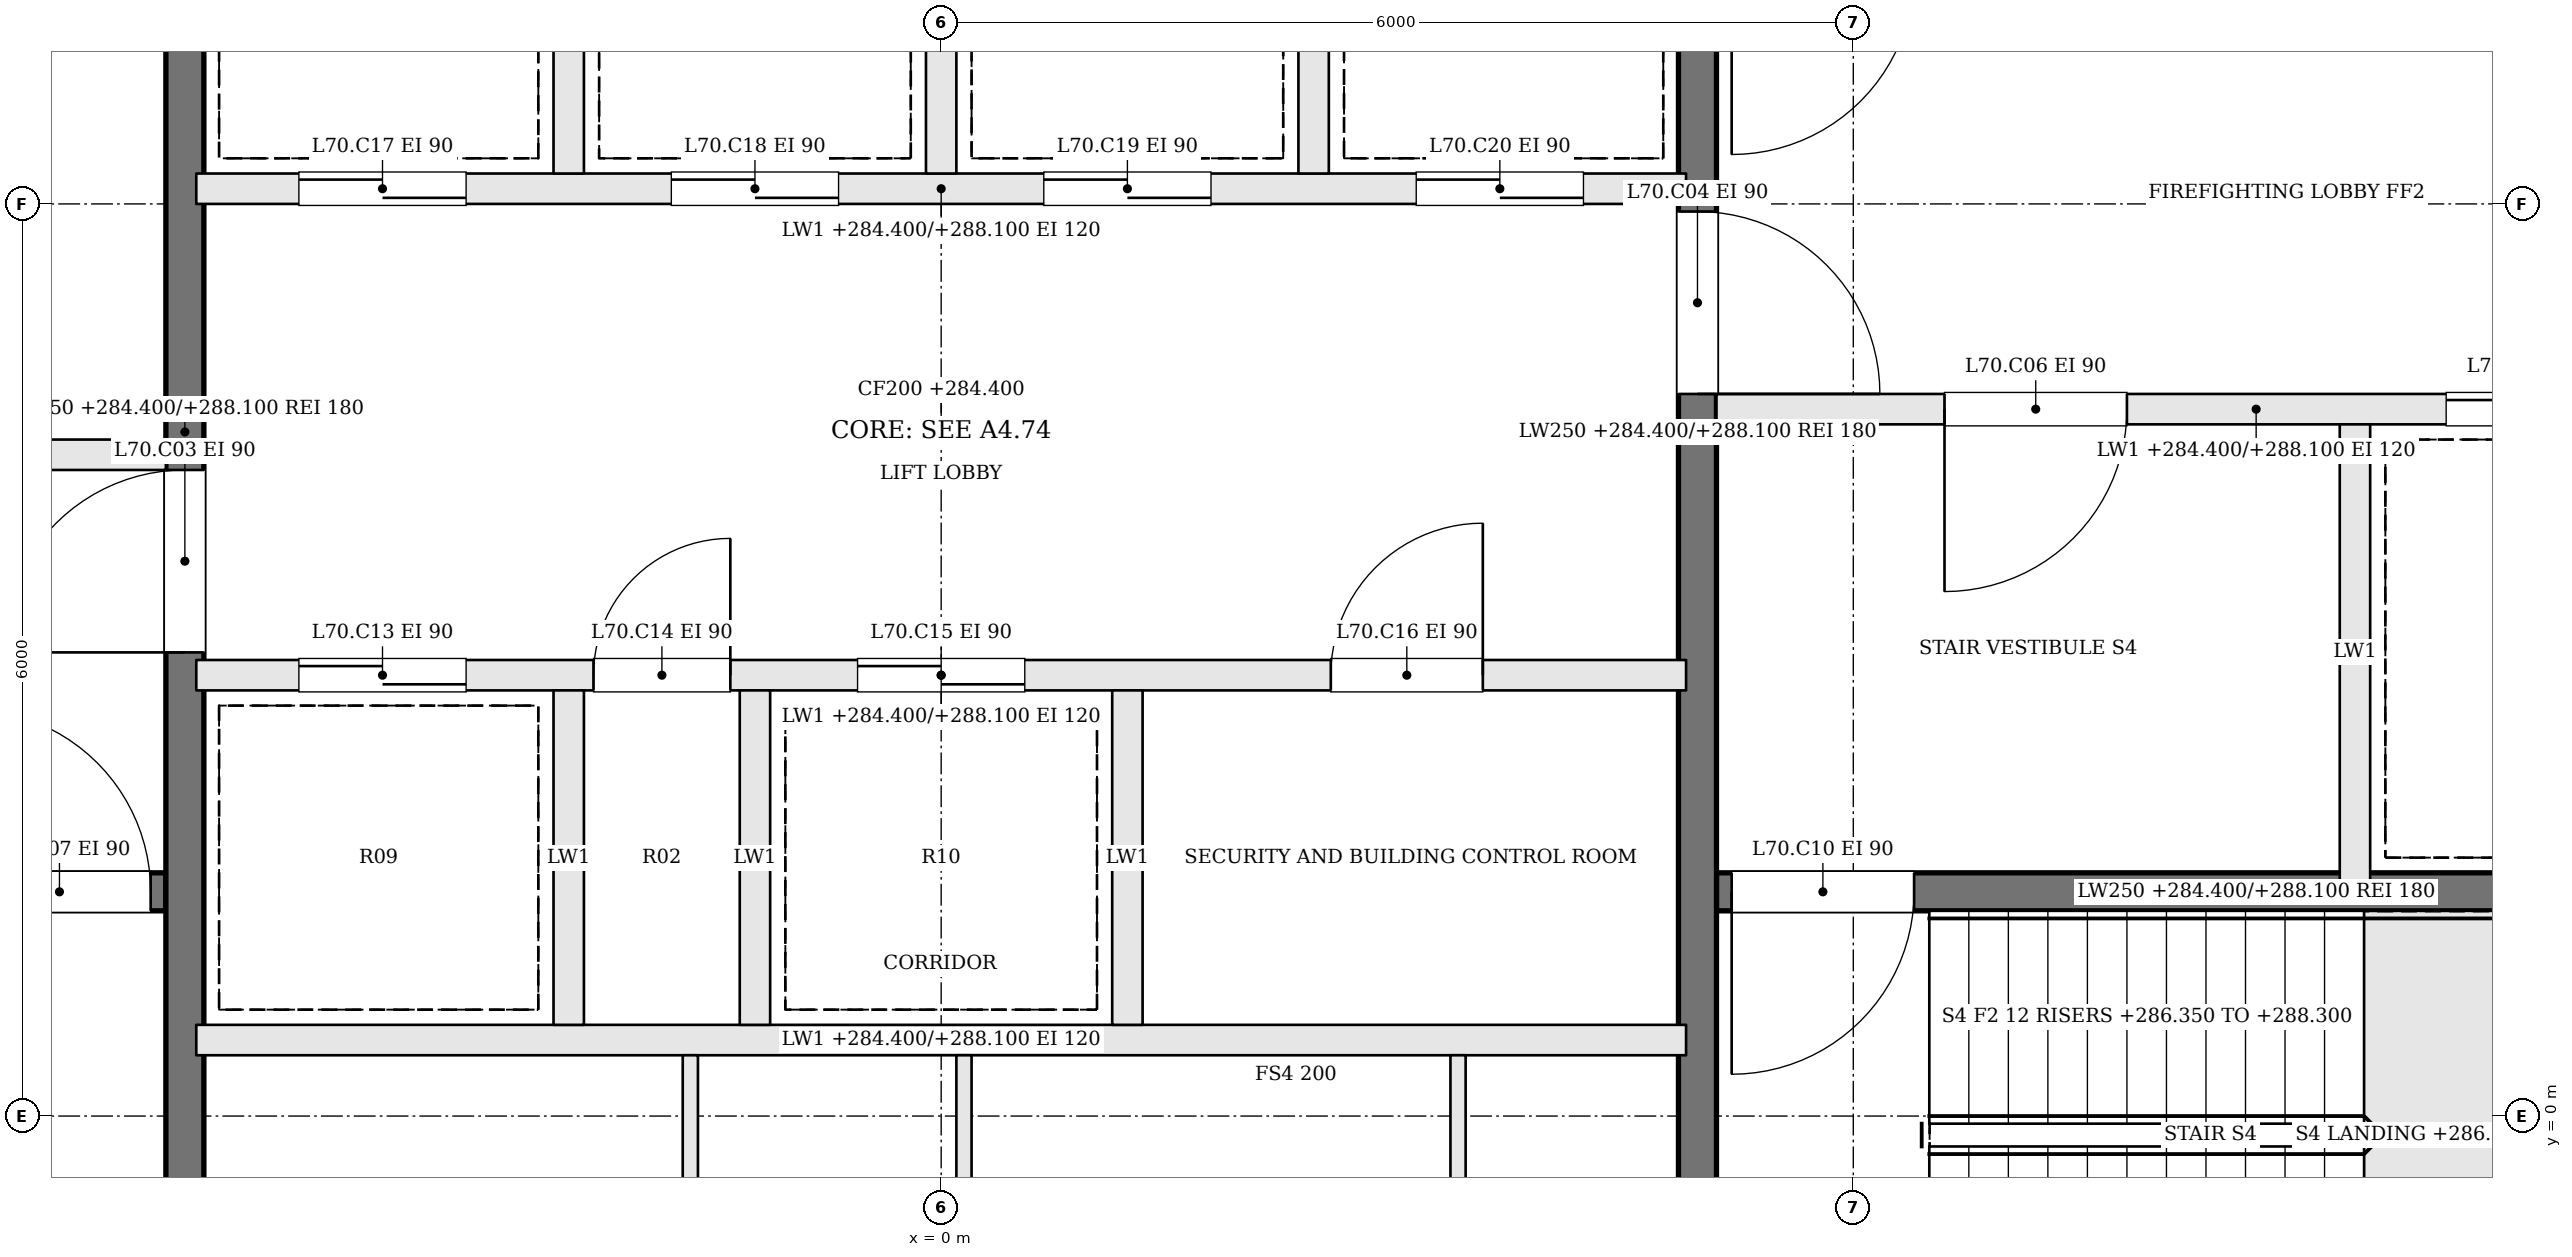
"""IFC4 building model, lengths in metres.
Left out: names, types, materials, properties, quantities, classifications, styles, units other than length and angle.
Written with IfcOpenShell. Run it as: python <this file> out.ifc"""

import sys

from ifc_helpers import new_model, si_unit, direction, frame, frame_2d, origin, place, context, subcontext, project, spatial, rectangle, extrude, element, fill, save


model = new_model("IFC4")
c1 = context("Model", 3, precision=1e-05, world=origin(), true_north=direction((0.0, 1.0)))
c2 = subcontext(c1, "Body", "Model", "MODEL_VIEW")
j1 = project(units=[si_unit("LENGTHUNIT", "METRE"), si_unit("PLANEANGLEUNIT", "RADIAN")], contexts=[c1])
p1 = place(None, origin())
s1 = spatial("IfcSite", under=j1, at=p1, CompositionType="ELEMENT")
p2 = place(p1, origin())
s2 = spatial("IfcBuilding", under=s1, at=p2, CompositionType="ELEMENT")
p3 = place(p2, frame((0.0, 0.0, 284.4)))
s3 = spatial("IfcBuildingStorey", under=s2, at=p3, CompositionType="ELEMENT", Elevation=284.4)
p4 = place(p3, frame((-12.2, 1.475, 0.0), z_axis=(0.0, 0.0, 1.0), x_axis=(1.0, 0.0, 0.0)))
e1 = element("IfcWall", 1, at=p4, inside=s3, PredefinedType="SOLIDWALL", context=c2, shape_type="SweptSolid", body=[
    extrude(rectangle(XDim=7.1, YDim=0.25, at=frame_2d((3.55, 0.0))), origin(), (0.0, 0.0, 1.0), 3.7),
])
p5 = place(p4, frame((5.8, 0.0, 0.0)))
e2 = element("IfcOpeningElement", 2, at=p5, cuts=e1, PredefinedType="OPENING", context=c2, shape_type="SweptSolid", body=[
    extrude(rectangle(XDim=1.2, YDim=2.1, at=frame_2d((0.6, 1.05))), frame((0.0, 0.135, 0.0), z_axis=(0.0, -1.0, 0.0), x_axis=(1.0, 0.0, 0.0)), (0.0, 0.0, 1.0), 0.27),
])
p6 = place(p3, frame((-12.2, 4.35, 0.0), z_axis=(0.0, 0.0, 1.0), x_axis=(1.0, 0.0, 0.0)))
e3 = element("IfcWall", 3, at=p6, inside=s3, PredefinedType="SOLIDWALL", context=c2, shape_type="SweptSolid", body=[
    extrude(rectangle(XDim=7.1, YDim=0.2, at=frame_2d((3.55, 0.0))), origin(), (0.0, 0.0, 1.0), 3.7),
])
p7 = place(p6, frame((4.4, 0.0, 0.0)))
e4 = element("IfcOpeningElement", 4, at=p7, cuts=e3, PredefinedType="OPENING", context=c2, shape_type="SweptSolid", body=[
    extrude(rectangle(XDim=1.2, YDim=2.1, at=frame_2d((0.6, 1.05))), frame((0.0, 0.11, 0.0), z_axis=(0.0, -1.0, 0.0), x_axis=(1.0, 0.0, 0.0)), (0.0, 0.0, 1.0), 0.22),
])
p8 = place(p6, frame((1.1, 0.0, 0.0)))
e5 = element("IfcOpeningElement", 5, at=p8, cuts=e3, PredefinedType="OPENING", context=c2, shape_type="SweptSolid", body=[
    extrude(rectangle(XDim=1.2, YDim=2.1, at=frame_2d((0.6, 1.05))), frame((0.0, 0.11, 0.0), z_axis=(0.0, -1.0, 0.0), x_axis=(1.0, 0.0, 0.0)), (0.0, 0.0, 1.0), 0.22),
])
p9 = place(p3, frame((12.2, 4.65, 0.0), z_axis=(0.0, 0.0, 1.0), x_axis=(-1.0, 0.0, 0.0)))
e6 = element("IfcWall", 6, at=p9, inside=s3, PredefinedType="SOLIDWALL", context=c2, shape_type="SweptSolid", body=[
    extrude(rectangle(XDim=7.1, YDim=0.2, at=frame_2d((3.55, 0.0))), origin(), (0.0, 0.0, 1.0), 3.7),
])
p10 = place(p9, frame((4.4, 0.0, 0.0)))
e7 = element("IfcOpeningElement", 7, at=p10, cuts=e6, PredefinedType="OPENING", context=c2, shape_type="SweptSolid", body=[
    extrude(rectangle(XDim=1.2, YDim=2.1, at=frame_2d((0.6, 1.05))), frame((0.0, 0.11, 0.0), z_axis=(0.0, -1.0, 0.0), x_axis=(1.0, 0.0, 0.0)), (0.0, 0.0, 1.0), 0.22),
])
p11 = place(p9, frame((1.1, 0.0, 0.0)))
e8 = element("IfcOpeningElement", 8, at=p11, cuts=e6, PredefinedType="OPENING", context=c2, shape_type="SweptSolid", body=[
    extrude(rectangle(XDim=1.2, YDim=2.1, at=frame_2d((0.6, 1.05))), frame((0.0, 0.11, 0.0), z_axis=(0.0, -1.0, 0.0), x_axis=(1.0, 0.0, 0.0)), (0.0, 0.0, 1.0), 0.22),
])
p12 = place(p3, frame((12.2, 1.475, 0.0), z_axis=(0.0, 0.0, 1.0), x_axis=(-1.0, 0.0, 0.0)))
e9 = element("IfcWall", 9, at=p12, inside=s3, PredefinedType="SOLIDWALL", context=c2, shape_type="SweptSolid", body=[
    extrude(rectangle(XDim=7.1, YDim=0.25, at=frame_2d((3.55, 0.0))), origin(), (0.0, 0.0, 1.0), 3.7),
])
p13 = place(p12, frame((5.8, 0.0, 0.0)))
e10 = element("IfcOpeningElement", 10, at=p13, cuts=e9, PredefinedType="OPENING", context=c2, shape_type="SweptSolid", body=[
    extrude(rectangle(XDim=1.2, YDim=2.1, at=frame_2d((0.6, 1.05))), frame((0.0, 0.135, 0.0), z_axis=(0.0, -1.0, 0.0), x_axis=(1.0, 0.0, 0.0)), (0.0, 0.0, 1.0), 0.27),
])
p14 = place(p3, frame((9.3, 4.55, 0.0), z_axis=(0.0, 0.0, 1.0), x_axis=(0.0, -1.0, 0.0)))
e11 = element("IfcWall", 11, at=p14, inside=s3, PredefinedType="SOLIDWALL", context=c2, shape_type="SweptSolid", body=[
    extrude(rectangle(XDim=3.0, YDim=0.2, at=frame_2d((1.5, 0.0))), origin(), (0.0, 0.0, 1.0), 3.7),
])
p15 = place(p3, frame((-4.975, -2.2, 0.0), z_axis=(0.0, 0.0, 1.0), x_axis=(0.0, 1.0, 0.0)))
e12 = element("IfcWall", 12, at=p15, inside=s3, PredefinedType="SOLIDWALL", context=c2, shape_type="SweptSolid", body=[
    extrude(rectangle(XDim=13.4, YDim=0.25, at=frame_2d((6.7, 0.0))), origin(), (0.0, 0.0, 1.0), 3.7),
])
p16 = place(p15, frame((5.25, 0.0, 0.0)))
e13 = element("IfcOpeningElement", 13, at=p16, cuts=e12, PredefinedType="OPENING", context=c2, shape_type="SweptSolid", body=[
    extrude(rectangle(XDim=1.2, YDim=2.1, at=frame_2d((0.6, 1.05))), frame((0.0, 0.135, 0.0), z_axis=(0.0, -1.0, 0.0), x_axis=(1.0, 0.0, 0.0)), (0.0, 0.0, 1.0), 0.27),
])
p17 = place(p3, frame((4.975, 11.2, 0.0), z_axis=(0.0, 0.0, 1.0), x_axis=(0.0, -1.0, 0.0)))
e14 = element("IfcWall", 14, at=p17, inside=s3, PredefinedType="SOLIDWALL", context=c2, shape_type="SweptSolid", body=[
    extrude(rectangle(XDim=13.4, YDim=0.25, at=frame_2d((6.7, 0.0))), origin(), (0.0, 0.0, 1.0), 3.7),
])
p18 = place(p17, frame((5.25, 0.0, 0.0)))
e15 = element("IfcOpeningElement", 15, at=p18, cuts=e14, PredefinedType="OPENING", context=c2, shape_type="SweptSolid", body=[
    extrude(rectangle(XDim=1.2, YDim=2.1, at=frame_2d((0.6, 1.05))), frame((0.0, 0.135, 0.0), z_axis=(0.0, -1.0, 0.0), x_axis=(1.0, 0.0, 0.0)), (0.0, 0.0, 1.0), 0.27),
])
p19 = place(p3, frame((-4.9, 0.5, 0.0), z_axis=(0.0, 0.0, 1.0), x_axis=(1.0, 0.0, 0.0)))
e16 = element("IfcWall", 16, at=p19, inside=s3, PredefinedType="SOLIDWALL", context=c2, shape_type="SweptSolid", body=[
    extrude(rectangle(XDim=9.8, YDim=0.2, at=frame_2d((4.9, 0.0))), origin(), (0.0, 0.0, 1.0), 3.7),
])
p20 = place(p3, frame((-4.9, 2.9, 0.0), z_axis=(0.0, 0.0, 1.0), x_axis=(1.0, 0.0, 0.0)))
e17 = element("IfcWall", 17, at=p20, inside=s3, PredefinedType="SOLIDWALL", context=c2, shape_type="SweptSolid", body=[
    extrude(rectangle(XDim=9.8, YDim=0.2, at=frame_2d((4.9, 0.0))), origin(), (0.0, 0.0, 1.0), 3.7),
])
p21 = place(p20, frame((0.675, 0.0, 0.0)))
e18 = element("IfcOpeningElement", 18, at=p21, cuts=e17, PredefinedType="OPENING", context=c2, shape_type="SweptSolid", body=[
    extrude(rectangle(XDim=1.1, YDim=2.1, at=frame_2d((0.55, 1.05))), frame((0.0, 0.11, 0.0), z_axis=(0.0, -1.0, 0.0), x_axis=(1.0, 0.0, 0.0)), (0.0, 0.0, 1.0), 0.22),
])
p22 = place(p20, frame((2.613, 0.0, 0.0)))
e19 = element("IfcOpeningElement", 19, at=p22, cuts=e17, PredefinedType="OPENING", context=c2, shape_type="SweptSolid", body=[
    extrude(rectangle(XDim=0.9, YDim=2.1, at=frame_2d((0.45, 1.05))), frame((0.0, 0.11, 0.0), z_axis=(0.0, -1.0, 0.0), x_axis=(1.0, 0.0, 0.0)), (0.0, 0.0, 1.0), 0.22),
])
p23 = place(p20, frame((4.35, 0.0, 0.0)))
e20 = element("IfcOpeningElement", 20, at=p23, cuts=e17, PredefinedType="OPENING", context=c2, shape_type="SweptSolid", body=[
    extrude(rectangle(XDim=1.1, YDim=2.1, at=frame_2d((0.55, 1.05))), frame((0.0, 0.11, 0.0), z_axis=(0.0, -1.0, 0.0), x_axis=(1.0, 0.0, 0.0)), (0.0, 0.0, 1.0), 0.22),
])
p24 = place(p20, frame((7.463, 0.0, 0.0)))
e21 = element("IfcOpeningElement", 21, at=p24, cuts=e17, PredefinedType="OPENING", context=c2, shape_type="SweptSolid", body=[
    extrude(rectangle(XDim=1.0, YDim=2.1, at=frame_2d((0.5, 1.05))), frame((0.0, 0.11, 0.0), z_axis=(0.0, -1.0, 0.0), x_axis=(1.0, 0.0, 0.0)), (0.0, 0.0, 1.0), 0.22),
])
p25 = place(p3, frame((-4.9, 6.1, 0.0), z_axis=(0.0, 0.0, 1.0), x_axis=(1.0, 0.0, 0.0)))
e22 = element("IfcWall", 22, at=p25, inside=s3, PredefinedType="SOLIDWALL", context=c2, shape_type="SweptSolid", body=[
    extrude(rectangle(XDim=9.8, YDim=0.2, at=frame_2d((4.9, 0.0))), origin(), (0.0, 0.0, 1.0), 3.7),
])
p26 = place(p25, frame((0.675, 0.0, 0.0)))
e23 = element("IfcOpeningElement", 23, at=p26, cuts=e22, PredefinedType="OPENING", context=c2, shape_type="SweptSolid", body=[
    extrude(rectangle(XDim=1.1, YDim=2.1, at=frame_2d((0.55, 1.05))), frame((0.0, 0.11, 0.0), z_axis=(0.0, -1.0, 0.0), x_axis=(1.0, 0.0, 0.0)), (0.0, 0.0, 1.0), 0.22),
])
p27 = place(p25, frame((3.125, 0.0, 0.0)))
e24 = element("IfcOpeningElement", 24, at=p27, cuts=e22, PredefinedType="OPENING", context=c2, shape_type="SweptSolid", body=[
    extrude(rectangle(XDim=1.1, YDim=2.1, at=frame_2d((0.55, 1.05))), frame((0.0, 0.11, 0.0), z_axis=(0.0, -1.0, 0.0), x_axis=(1.0, 0.0, 0.0)), (0.0, 0.0, 1.0), 0.22),
])
p28 = place(p25, frame((5.575, 0.0, 0.0)))
e25 = element("IfcOpeningElement", 25, at=p28, cuts=e22, PredefinedType="OPENING", context=c2, shape_type="SweptSolid", body=[
    extrude(rectangle(XDim=1.1, YDim=2.1, at=frame_2d((0.55, 1.05))), frame((0.0, 0.11, 0.0), z_axis=(0.0, -1.0, 0.0), x_axis=(1.0, 0.0, 0.0)), (0.0, 0.0, 1.0), 0.22),
])
p29 = place(p25, frame((8.025, 0.0, 0.0)))
e26 = element("IfcOpeningElement", 26, at=p29, cuts=e22, PredefinedType="OPENING", context=c2, shape_type="SweptSolid", body=[
    extrude(rectangle(XDim=1.1, YDim=2.1, at=frame_2d((0.55, 1.05))), frame((0.0, 0.11, 0.0), z_axis=(0.0, -1.0, 0.0), x_axis=(1.0, 0.0, 0.0)), (0.0, 0.0, 1.0), 0.22),
])
for number, where, z_axis, x_axis in (
    (27, (-2.45, 0.6, 0.0), (0.0, 0.0, 1.0), (0.0, 1.0, 0.0)),
    (28, (-1.225, 0.6, 0.0), (0.0, 0.0, 1.0), (0.0, 1.0, 0.0)),
    (29, (1.225, 0.6, 0.0), (0.0, 0.0, 1.0), (0.0, 1.0, 0.0)),
    (30, (-2.45, 6.2, 0.0), (0.0, 0.0, 1.0), (0.0, 1.0, 0.0)),
    (31, (0.0, 6.2, 0.0), (0.0, 0.0, 1.0), (0.0, 1.0, 0.0)),
    (32, (2.45, 6.2, 0.0), (0.0, 0.0, 1.0), (0.0, 1.0, 0.0)),
):
    element("IfcWall", number, at=place(p3, frame(where, z_axis=z_axis, x_axis=x_axis)), inside=s3, PredefinedType="SOLIDWALL", context=c2, shape_type="SweptSolid", body=[
        extrude(rectangle(XDim=2.2, YDim=0.2, at=frame_2d((1.1, 0.0))), origin(), (0.0, 0.0, 1.0), 3.7),
    ])
for number, where, z_axis, x_axis in (
    (33, (-1.65, -2.2, 0.0), (0.0, 0.0, 1.0), (0.0, 1.0, 0.0)),
    (34, (0.15, -2.2, 0.0), (0.0, 0.0, 1.0), (0.0, 1.0, 0.0)),
    (35, (3.4, -2.2, 0.0), (0.0, 0.0, 1.0), (0.0, 1.0, 0.0)),
):
    element("IfcWall", number, at=place(p3, frame(where, z_axis=z_axis, x_axis=x_axis)), inside=s3, PredefinedType="PARTITIONING", context=c2, shape_type="SweptSolid", body=[
        extrude(rectangle(XDim=2.6, YDim=0.1, at=frame_2d((1.3, 0.0))), origin(), (0.0, 0.0, 1.0), 3.7),
    ])
p30 = place(p16, origin())
e36 = element("IfcDoor", 36, at=p30, inside=s3, OperationType="SINGLE_SWING_LEFT", PredefinedType="DOOR", context=c2, shape_type="SweptSolid", body=[
    extrude(rectangle(XDim=1.2, YDim=2.1, at=frame_2d((0.6, 1.05))), frame((0.0, 0.025, 0.0), z_axis=(0.0, -1.0, 0.0), x_axis=(1.0, 0.0, 0.0)), (0.0, 0.0, 1.0), 0.05),
])
fill(e13, e36)
p31 = place(p18, origin())
e37 = element("IfcDoor", 37, at=p31, inside=s3, OperationType="SINGLE_SWING_RIGHT", PredefinedType="DOOR", context=c2, shape_type="SweptSolid", body=[
    extrude(rectangle(XDim=1.2, YDim=2.1, at=frame_2d((0.6, 1.05))), frame((0.0, 0.025, 0.0), z_axis=(0.0, -1.0, 0.0), x_axis=(1.0, 0.0, 0.0)), (0.0, 0.0, 1.0), 0.05),
])
fill(e15, e37)
p32 = place(p10, origin())
e38 = element("IfcDoor", 38, at=p32, inside=s3, OperationType="SINGLE_SWING_RIGHT", PredefinedType="DOOR", context=c2, shape_type="SweptSolid", body=[
    extrude(rectangle(XDim=1.2, YDim=2.1, at=frame_2d((0.6, 1.05))), frame((0.0, 0.025, 0.0), z_axis=(0.0, -1.0, 0.0), x_axis=(1.0, 0.0, 0.0)), (0.0, 0.0, 1.0), 0.05),
])
fill(e7, e38)
p33 = place(p5, origin())
e39 = element("IfcDoor", 39, at=p33, inside=s3, OperationType="SINGLE_SWING_LEFT", PredefinedType="DOOR", context=c2, shape_type="SweptSolid", body=[
    extrude(rectangle(XDim=1.2, YDim=2.1, at=frame_2d((0.6, 1.05))), frame((0.0, 0.025, 0.0), z_axis=(0.0, -1.0, 0.0), x_axis=(1.0, 0.0, 0.0)), (0.0, 0.0, 1.0), 0.05),
])
fill(e2, e39)
p34 = place(p13, origin())
e40 = element("IfcDoor", 40, at=p34, inside=s3, OperationType="SINGLE_SWING_RIGHT", PredefinedType="DOOR", context=c2, shape_type="SweptSolid", body=[
    extrude(rectangle(XDim=1.2, YDim=2.1, at=frame_2d((0.6, 1.05))), frame((0.0, 0.025, 0.0), z_axis=(0.0, -1.0, 0.0), x_axis=(1.0, 0.0, 0.0)), (0.0, 0.0, 1.0), 0.05),
])
fill(e10, e40)
p35 = place(p11, origin())
e41 = element("IfcDoor", 41, at=p35, inside=s3, OperationType="SLIDING_TO_RIGHT", PredefinedType="DOOR", context=c2, shape_type="SweptSolid", body=[
    extrude(rectangle(XDim=1.2, YDim=2.1, at=frame_2d((0.6, 1.05))), frame((0.0, 0.025, 0.0), z_axis=(0.0, -1.0, 0.0), x_axis=(1.0, 0.0, 0.0)), (0.0, 0.0, 1.0), 0.05),
])
fill(e8, e41)
p36 = place(p21, origin())
e42 = element("IfcDoor", 42, at=p36, inside=s3, OperationType="SLIDING_TO_RIGHT", PredefinedType="DOOR", context=c2, shape_type="SweptSolid", body=[
    extrude(rectangle(XDim=1.1, YDim=2.1, at=frame_2d((0.55, 1.05))), frame((0.0, 0.025, 0.0), z_axis=(0.0, -1.0, 0.0), x_axis=(1.0, 0.0, 0.0)), (0.0, 0.0, 1.0), 0.05),
])
fill(e18, e42)
p37 = place(p22, origin())
e43 = element("IfcDoor", 43, at=p37, inside=s3, OperationType="SINGLE_SWING_RIGHT", PredefinedType="DOOR", context=c2, shape_type="SweptSolid", body=[
    extrude(rectangle(XDim=0.9, YDim=2.1, at=frame_2d((0.45, 1.05))), frame((0.0, 0.025, 0.0), z_axis=(0.0, -1.0, 0.0), x_axis=(1.0, 0.0, 0.0)), (0.0, 0.0, 1.0), 0.05),
])
fill(e19, e43)
p38 = place(p23, origin())
e44 = element("IfcDoor", 44, at=p38, inside=s3, OperationType="SLIDING_TO_LEFT", PredefinedType="DOOR", context=c2, shape_type="SweptSolid", body=[
    extrude(rectangle(XDim=1.1, YDim=2.1, at=frame_2d((0.55, 1.05))), frame((0.0, 0.025, 0.0), z_axis=(0.0, -1.0, 0.0), x_axis=(1.0, 0.0, 0.0)), (0.0, 0.0, 1.0), 0.05),
])
fill(e20, e44)
p39 = place(p24, origin())
e45 = element("IfcDoor", 45, at=p39, inside=s3, OperationType="SINGLE_SWING_RIGHT", PredefinedType="DOOR", context=c2, shape_type="SweptSolid", body=[
    extrude(rectangle(XDim=1.0, YDim=2.1, at=frame_2d((0.5, 1.05))), frame((0.0, 0.025, 0.0), z_axis=(0.0, -1.0, 0.0), x_axis=(1.0, 0.0, 0.0)), (0.0, 0.0, 1.0), 0.05),
])
fill(e21, e45)
p40 = place(p26, origin())
e46 = element("IfcDoor", 46, at=p40, inside=s3, OperationType="SLIDING_TO_RIGHT", PredefinedType="DOOR", context=c2, shape_type="SweptSolid", body=[
    extrude(rectangle(XDim=1.1, YDim=2.1, at=frame_2d((0.55, 1.05))), frame((0.0, 0.025, 0.0), z_axis=(0.0, -1.0, 0.0), x_axis=(1.0, 0.0, 0.0)), (0.0, 0.0, 1.0), 0.05),
])
fill(e23, e46)
p41 = place(p27, origin())
e47 = element("IfcDoor", 47, at=p41, inside=s3, OperationType="SLIDING_TO_LEFT", PredefinedType="DOOR", context=c2, shape_type="SweptSolid", body=[
    extrude(rectangle(XDim=1.1, YDim=2.1, at=frame_2d((0.55, 1.05))), frame((0.0, 0.025, 0.0), z_axis=(0.0, -1.0, 0.0), x_axis=(1.0, 0.0, 0.0)), (0.0, 0.0, 1.0), 0.05),
])
fill(e24, e47)
p42 = place(p28, origin())
e48 = element("IfcDoor", 48, at=p42, inside=s3, OperationType="SLIDING_TO_RIGHT", PredefinedType="DOOR", context=c2, shape_type="SweptSolid", body=[
    extrude(rectangle(XDim=1.1, YDim=2.1, at=frame_2d((0.55, 1.05))), frame((0.0, 0.025, 0.0), z_axis=(0.0, -1.0, 0.0), x_axis=(1.0, 0.0, 0.0)), (0.0, 0.0, 1.0), 0.05),
])
fill(e25, e48)
p43 = place(p29, origin())
e49 = element("IfcDoor", 49, at=p43, inside=s3, OperationType="SLIDING_TO_LEFT", PredefinedType="DOOR", context=c2, shape_type="SweptSolid", body=[
    extrude(rectangle(XDim=1.1, YDim=2.1, at=frame_2d((0.55, 1.05))), frame((0.0, 0.025, 0.0), z_axis=(0.0, -1.0, 0.0), x_axis=(1.0, 0.0, 0.0)), (0.0, 0.0, 1.0), 0.05),
])
fill(e26, e49)
save(model, sys.argv[1])
